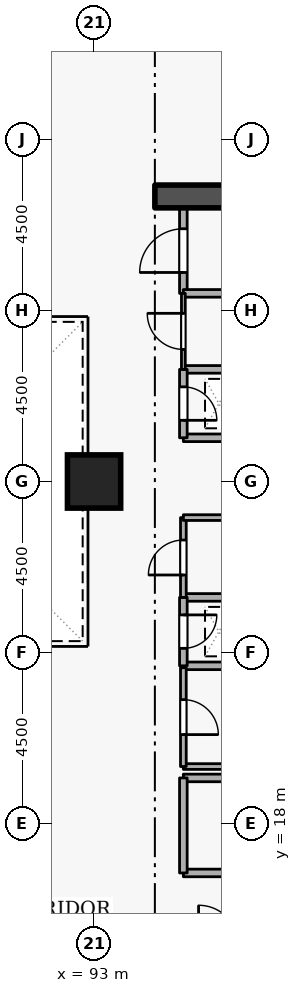
"""IFC4 building model, lengths in metres.
Left out: names, types, materials, properties, quantities, classifications, styles, units other than length and angle.
Written with IfcOpenShell. Run it as: python <this file> out.ifc"""

import sys

from ifc_helpers import new_model, si_unit, direction, frame, frame_2d, origin, origin_2d, place, context, subcontext, project, spatial, rectangle, extrude, element, fill, save


model = new_model("IFC4")
c1 = context("Model", 3, precision=1e-05, world=origin(), true_north=direction((0.0, 1.0)))
c2 = subcontext(c1, "Body", "Model", "MODEL_VIEW")
j1 = project(units=[si_unit("LENGTHUNIT", "METRE"), si_unit("PLANEANGLEUNIT", "RADIAN")], contexts=[c1])
p1 = place(None, origin())
s1 = spatial("IfcSite", under=j1, at=p1, CompositionType="ELEMENT")
p2 = place(p1, origin())
s2 = spatial("IfcBuilding", under=s1, at=p2, CompositionType="ELEMENT")
p3 = place(p2, frame((0.0, 0.0, 14.1)))
s3 = spatial("IfcBuildingStorey", under=s2, at=p3, CompositionType="ELEMENT", Elevation=14.1)
p4 = place(p3, frame((94.6, 34.5, 0.0), z_axis=(0.0, 0.0, 1.0), x_axis=(1.0, 0.0, 0.0)))
e1 = element("IfcWall", 1, at=p4, inside=s3, PredefinedType="SHEAR", context=c2, shape_type="SweptSolid", body=[
    extrude(rectangle(XDim=5.7, YDim=0.6, at=frame_2d((2.85, 0.0))), origin(), (0.0, 0.0, 1.0), 4.5),
])
p5 = place(p3, frame((93.0, 27.0, 0.0), z_axis=(0.0, 0.0, 1.0), x_axis=(1.0, 0.0, 0.0)))
e2 = element("IfcColumn", 2, at=p5, inside=s3, PredefinedType="COLUMN", context=c2, shape_type="SweptSolid", body=[
    extrude(rectangle(XDim=1.4, YDim=1.4, at=origin_2d()), origin(), (0.0, 0.0, 1.0), 4.5),
])
p6 = place(p3, frame((95.35, 16.7, 0.0), z_axis=(0.0, 0.0, 1.0), x_axis=(1.0, 0.0, 0.0)))
e3 = element("IfcWall", 3, at=p6, inside=s3, PredefinedType="STANDARD", context=c2, shape_type="SweptSolid", body=[
    extrude(rectangle(XDim=5.15, YDim=0.2, at=frame_2d((2.575, 0.0))), origin(), (0.0, 0.0, 1.0), 4.16),
])
p7 = place(p6, frame((2.0, 0.0, 0.0)))
e4 = element("IfcOpeningElement", 4, at=p7, cuts=e3, PredefinedType="OPENING", context=c2, shape_type="SweptSolid", body=[
    extrude(rectangle(XDim=1.15, YDim=2.1, at=frame_2d((0.575, 1.05))), frame((0.0, 0.11, 0.0), z_axis=(0.0, -1.0, 0.0), x_axis=(1.0, 0.0, 0.0)), (0.0, 0.0, 1.0), 0.22),
])
p8 = place(p3, frame((97.1, 19.2, 0.0), z_axis=(0.0, 0.0, 1.0), x_axis=(-1.0, 0.0, 0.0)))
e5 = element("IfcWall", 5, at=p8, inside=s3, PredefinedType="STANDARD", context=c2, shape_type="SweptSolid", body=[
    extrude(rectangle(XDim=1.75, YDim=0.2, at=frame_2d((0.875, 0.0))), origin(), (0.0, 0.0, 1.0), 3.365),
])
p9 = place(p3, frame((95.35, 19.2, 0.0), z_axis=(0.0, 0.0, 1.0), x_axis=(0.0, -1.0, 0.0)))
e6 = element("IfcWall", 6, at=p9, inside=s3, PredefinedType="STANDARD", context=c2, shape_type="SweptSolid", body=[
    extrude(rectangle(XDim=2.5, YDim=0.2, at=frame_2d((1.25, 0.0))), origin(), (0.0, 0.0, 1.0), 4.16),
])
for number, where, z_axis, x_axis in (
    (7, (95.35, 28.15, 0.0), (0.0, 0.0, 1.0), (1.0, 0.0, 0.0)),
    (8, (96.85, 29.95, 0.0), (0.0, 0.0, 1.0), (-1.0, 0.0, 0.0)),
):
    element("IfcWall", number, at=place(p3, frame(where, z_axis=z_axis, x_axis=x_axis)), inside=s3, PredefinedType="STANDARD", context=c2, shape_type="SweptSolid", body=[
        extrude(rectangle(XDim=1.5, YDim=0.2, at=frame_2d((0.75, 0.0))), origin(), (0.0, 0.0, 1.0), 4.16),
    ])
p10 = place(p3, frame((95.35, 29.95, 0.0), z_axis=(0.0, 0.0, 1.0), x_axis=(0.0, -1.0, 0.0)))
e9 = element("IfcWall", 9, at=p10, inside=s3, PredefinedType="STANDARD", context=c2, shape_type="SweptSolid", body=[
    extrude(rectangle(XDim=1.8, YDim=0.2, at=frame_2d((0.9, 0.0))), origin(), (0.0, 0.0, 1.0), 4.16),
])
p11 = place(p10, frame((0.46, 0.0, 0.0)))
e10 = element("IfcOpeningElement", 10, at=p11, cuts=e9, PredefinedType="OPENING", context=c2, shape_type="SweptSolid", body=[
    extrude(rectangle(XDim=0.88, YDim=2.04, at=frame_2d((0.44, 1.02))), frame((0.0, 0.11, 0.0), z_axis=(0.0, -1.0, 0.0), x_axis=(1.0, 0.0, 0.0)), (0.0, 0.0, 1.0), 0.22),
])
for number, where, z_axis, x_axis in (
    (11, (95.35, 22.15, 0.0), (0.0, 0.0, 1.0), (1.0, 0.0, 0.0)),
    (12, (96.85, 23.95, 0.0), (0.0, 0.0, 1.0), (-1.0, 0.0, 0.0)),
):
    element("IfcWall", number, at=place(p3, frame(where, z_axis=z_axis, x_axis=x_axis)), inside=s3, PredefinedType="STANDARD", context=c2, shape_type="SweptSolid", body=[
        extrude(rectangle(XDim=1.5, YDim=0.2, at=frame_2d((0.75, 0.0))), origin(), (0.0, 0.0, 1.0), 4.16),
    ])
p12 = place(p3, frame((95.35, 23.95, 0.0), z_axis=(0.0, 0.0, 1.0), x_axis=(0.0, -1.0, 0.0)))
e13 = element("IfcWall", 13, at=p12, inside=s3, PredefinedType="STANDARD", context=c2, shape_type="SweptSolid", body=[
    extrude(rectangle(XDim=1.8, YDim=0.2, at=frame_2d((0.9, 0.0))), origin(), (0.0, 0.0, 1.0), 4.16),
])
p13 = place(p12, frame((0.46, 0.0, 0.0)))
e14 = element("IfcOpeningElement", 14, at=p13, cuts=e13, PredefinedType="OPENING", context=c2, shape_type="SweptSolid", body=[
    extrude(rectangle(XDim=0.88, YDim=2.04, at=frame_2d((0.44, 1.02))), frame((0.0, 0.11, 0.0), z_axis=(0.0, -1.0, 0.0), x_axis=(1.0, 0.0, 0.0)), (0.0, 0.0, 1.0), 0.22),
])
p14 = place(p3, frame((95.35, 31.95, 0.0), z_axis=(0.0, 0.0, 1.0), x_axis=(0.0, 1.0, 0.0)))
e15 = element("IfcWall", 15, at=p14, inside=s3, PredefinedType="STANDARD", context=c2, shape_type="SweptSolid", body=[
    extrude(rectangle(XDim=2.25, YDim=0.2, at=frame_2d((1.125, 0.0))), origin(), (0.0, 0.0, 1.0), 4.16),
])
p15 = place(p14, frame((0.55, 0.0, 0.0)))
e16 = element("IfcOpeningElement", 16, at=p15, cuts=e15, PredefinedType="OPENING", context=c2, shape_type="SweptSolid", body=[
    extrude(rectangle(XDim=1.15, YDim=2.1, at=frame_2d((0.575, 1.05))), frame((0.0, 0.11, 0.0), z_axis=(0.0, -1.0, 0.0), x_axis=(1.0, 0.0, 0.0)), (0.0, 0.0, 1.0), 0.22),
])
p16 = place(p3, frame((96.85, 31.95, 0.0), z_axis=(0.0, 0.0, 1.0), x_axis=(-1.0, 0.0, 0.0)))
e17 = element("IfcWall", 17, at=p16, inside=s3, PredefinedType="STANDARD", context=c2, shape_type="SweptSolid", body=[
    extrude(rectangle(XDim=1.5, YDim=0.2, at=frame_2d((0.75, 0.0))), origin(), (0.0, 0.0, 1.0), 4.16),
])
p17 = place(p3, frame((95.35, 19.5, 0.0), z_axis=(0.0, 0.0, 1.0), x_axis=(1.0, 0.0, 0.0)))
e18 = element("IfcWall", 18, at=p17, inside=s3, PredefinedType="PARTITIONING", context=c2, shape_type="SweptSolid", body=[
    extrude(rectangle(XDim=1.5, YDim=0.15, at=frame_2d((0.75, 0.0))), origin(), (0.0, 0.0, 1.0), 3.365),
])
p18 = place(p3, frame((95.35, 22.1, 0.0), z_axis=(0.0, 0.0, 1.0), x_axis=(0.0, -1.0, 0.0)))
e19 = element("IfcWall", 19, at=p18, inside=s3, PredefinedType="PARTITIONING", context=c2, shape_type="SweptSolid", body=[
    extrude(rectangle(XDim=2.6, YDim=0.15, at=frame_2d((1.3, 0.0))), origin(), (0.0, 0.0, 1.0), 4.16),
])
p19 = place(p18, frame((0.84, 0.0, 0.0)))
e20 = element("IfcOpeningElement", 20, at=p19, cuts=e19, PredefinedType="OPENING", context=c2, shape_type="SweptSolid", body=[
    extrude(rectangle(XDim=0.92, YDim=2.08, at=frame_2d((0.46, 1.04))), frame((0.0, 0.085, 0.0), z_axis=(0.0, -1.0, 0.0), x_axis=(1.0, 0.0, 0.0)), (0.0, 0.0, 1.0), 0.17),
])
p20 = place(p3, frame((95.35, 23.95, 0.0), z_axis=(0.0, 0.0, 1.0), x_axis=(0.0, 1.0, 0.0)))
e21 = element("IfcWall", 21, at=p20, inside=s3, PredefinedType="PARTITIONING", context=c2, shape_type="SweptSolid", body=[
    extrude(rectangle(XDim=2.1, YDim=0.15, at=frame_2d((1.05, 0.0))), origin(), (0.0, 0.0, 1.0), 4.16),
])
p21 = place(p20, frame((0.59, 0.0, 0.0)))
e22 = element("IfcOpeningElement", 22, at=p21, cuts=e21, PredefinedType="OPENING", context=c2, shape_type="SweptSolid", body=[
    extrude(rectangle(XDim=0.92, YDim=2.08, at=frame_2d((0.46, 1.04))), frame((0.0, 0.085, 0.0), z_axis=(0.0, -1.0, 0.0), x_axis=(1.0, 0.0, 0.0)), (0.0, 0.0, 1.0), 0.17),
])
p22 = place(p3, frame((95.35, 26.05, 0.0), z_axis=(0.0, 0.0, 1.0), x_axis=(1.0, 0.0, 0.0)))
e23 = element("IfcWall", 23, at=p22, inside=s3, PredefinedType="PARTITIONING", context=c2, shape_type="SweptSolid", body=[
    extrude(rectangle(XDim=1.5, YDim=0.15, at=frame_2d((0.75, 0.0))), origin(), (0.0, 0.0, 1.0), 4.16),
])
p23 = place(p3, frame((95.35, 29.95, 0.0), z_axis=(0.0, 0.0, 1.0), x_axis=(0.0, 1.0, 0.0)))
e24 = element("IfcWall", 24, at=p23, inside=s3, PredefinedType="PARTITIONING", context=c2, shape_type="SweptSolid", body=[
    extrude(rectangle(XDim=2.0, YDim=0.1, at=frame_2d((1.0, 0.0))), origin(), (0.0, 0.0, 1.0), 4.16),
])
p24 = place(p23, frame((0.525, 0.0, 0.0)))
e25 = element("IfcOpeningElement", 25, at=p24, cuts=e24, PredefinedType="OPENING", context=c2, shape_type="SweptSolid", body=[
    extrude(rectangle(XDim=0.95, YDim=2.1, at=frame_2d((0.475, 1.05))), frame((0.0, 0.06, 0.0), z_axis=(0.0, -1.0, 0.0), x_axis=(1.0, 0.0, 0.0)), (0.0, 0.0, 1.0), 0.12),
])
p25 = place(p11, origin())
e26 = element("IfcDoor", 26, at=p25, inside=s3, OperationType="SINGLE_SWING_RIGHT", PredefinedType="DOOR", context=c2, shape_type="SweptSolid", body=[
    extrude(rectangle(XDim=0.88, YDim=2.04, at=frame_2d((0.44, 1.02))), frame((0.0, 0.025, 0.0), z_axis=(0.0, -1.0, 0.0), x_axis=(1.0, 0.0, 0.0)), (0.0, 0.0, 1.0), 0.05),
])
fill(e10, e26)
p26 = place(p13, origin())
e27 = element("IfcDoor", 27, at=p26, inside=s3, OperationType="SINGLE_SWING_LEFT", PredefinedType="DOOR", context=c2, shape_type="SweptSolid", body=[
    extrude(rectangle(XDim=0.88, YDim=2.04, at=frame_2d((0.44, 1.02))), frame((0.0, 0.025, 0.0), z_axis=(0.0, -1.0, 0.0), x_axis=(1.0, 0.0, 0.0)), (0.0, 0.0, 1.0), 0.05),
])
fill(e14, e27)
p27 = place(p19, origin())
e28 = element("IfcDoor", 28, at=p27, inside=s3, OperationType="SINGLE_SWING_RIGHT", PredefinedType="DOOR", context=c2, shape_type="SweptSolid", body=[
    extrude(rectangle(XDim=0.92, YDim=2.08, at=frame_2d((0.46, 1.04))), frame((0.0, 0.025, 0.0), z_axis=(0.0, -1.0, 0.0), x_axis=(1.0, 0.0, 0.0)), (0.0, 0.0, 1.0), 0.05),
])
fill(e20, e28)
p28 = place(p21, origin())
e29 = element("IfcDoor", 29, at=p28, inside=s3, OperationType="SINGLE_SWING_LEFT", PredefinedType="DOOR", context=c2, shape_type="SweptSolid", body=[
    extrude(rectangle(XDim=0.92, YDim=2.08, at=frame_2d((0.46, 1.04))), frame((0.0, 0.025, 0.0), z_axis=(0.0, -1.0, 0.0), x_axis=(1.0, 0.0, 0.0)), (0.0, 0.0, 1.0), 0.05),
])
fill(e22, e29)
p29 = place(p24, origin())
e30 = element("IfcDoor", 30, at=p29, inside=s3, OperationType="SINGLE_SWING_RIGHT", PredefinedType="DOOR", context=c2, shape_type="SweptSolid", body=[
    extrude(rectangle(XDim=0.95, YDim=2.1, at=frame_2d((0.475, 1.05))), frame((0.0, 0.025, 0.0), z_axis=(0.0, -1.0, 0.0), x_axis=(1.0, 0.0, 0.0)), (0.0, 0.0, 1.0), 0.05),
])
fill(e25, e30)
p30 = place(p15, origin())
e31 = element("IfcDoor", 31, at=p30, inside=s3, OperationType="SINGLE_SWING_LEFT", PredefinedType="DOOR", context=c2, shape_type="SweptSolid", body=[
    extrude(rectangle(XDim=1.15, YDim=2.1, at=frame_2d((0.575, 1.05))), frame((0.0, 0.025, 0.0), z_axis=(0.0, -1.0, 0.0), x_axis=(1.0, 0.0, 0.0)), (0.0, 0.0, 1.0), 0.05),
])
fill(e16, e31)
save(model, sys.argv[1])
